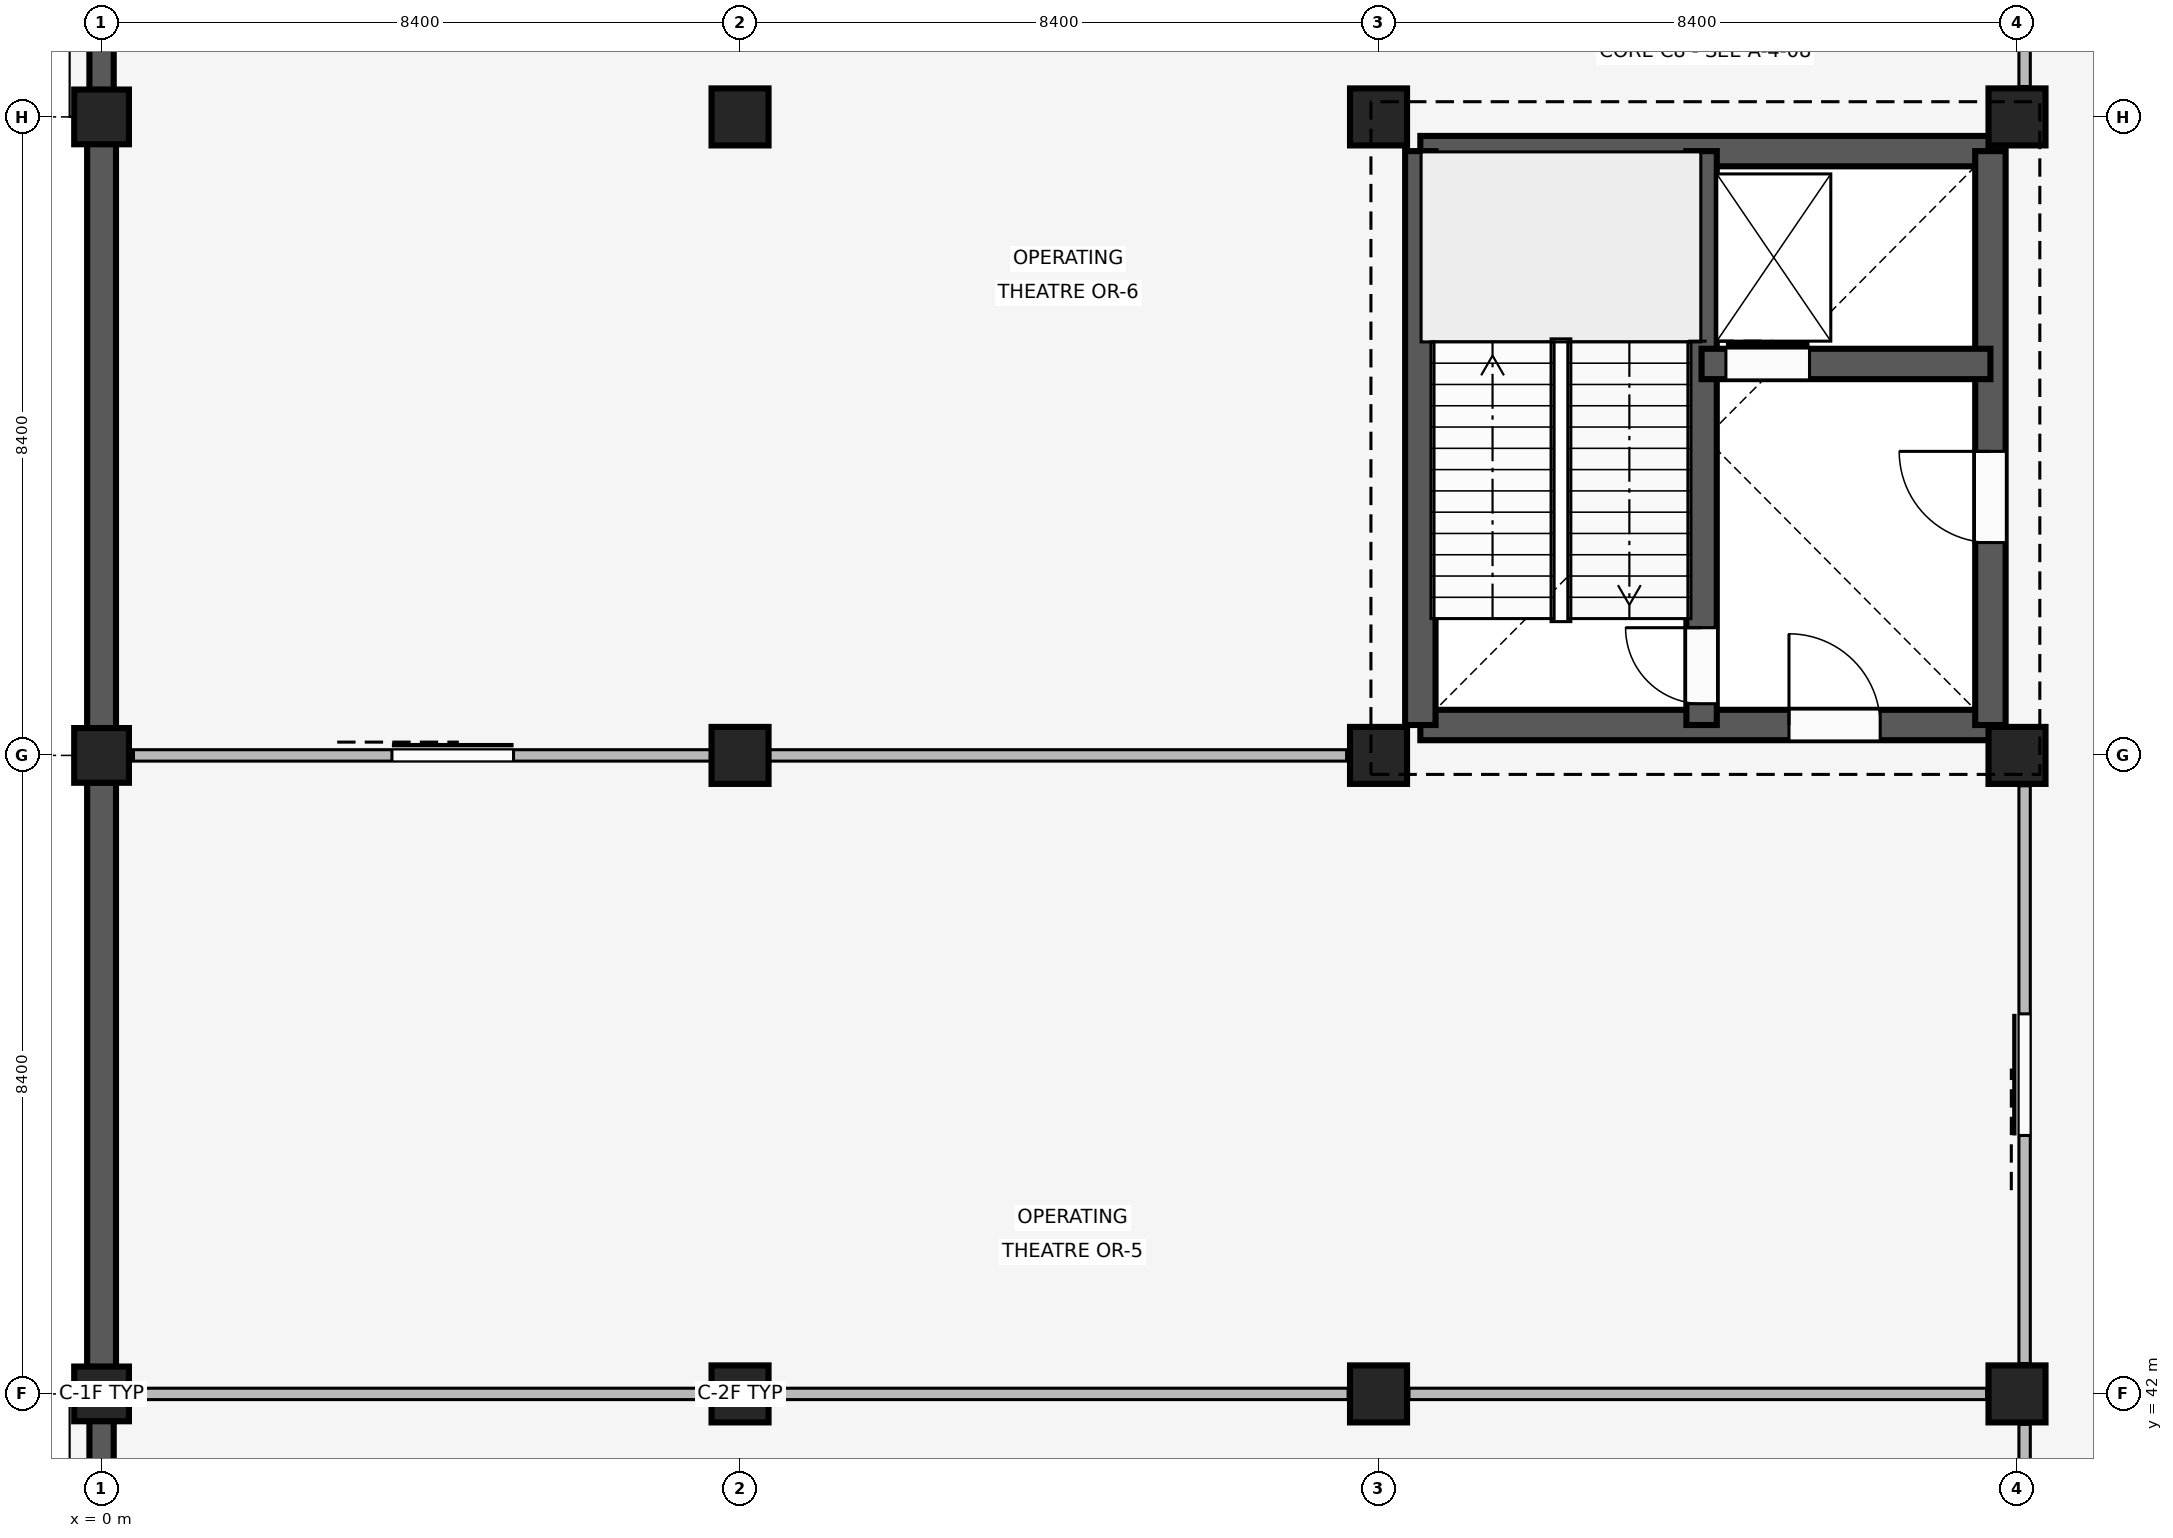
"""IFC4 building model, lengths in metres.
Left out: names, types, materials, properties, quantities, classifications, styles, units other than length and angle.
Written with IfcOpenShell. Run it as: python <this file> out.ifc"""

import sys

from ifc_helpers import new_model, si_unit, direction, frame, frame_2d, origin, origin_2d, place, context, subcontext, project, spatial, rectangle, extrude, element, fill, save


model = new_model("IFC4")
c1 = context("Model", 3, precision=1e-05, world=origin(), true_north=direction((0.0, 1.0)))
c2 = subcontext(c1, "Body", "Model", "MODEL_VIEW")
j1 = project(units=[si_unit("LENGTHUNIT", "METRE"), si_unit("PLANEANGLEUNIT", "RADIAN")], contexts=[c1])
p1 = place(None, origin())
s1 = spatial("IfcSite", under=j1, at=p1, CompositionType="ELEMENT")
p2 = place(p1, origin())
s2 = spatial("IfcBuilding", under=s1, at=p2, CompositionType="ELEMENT")
p3 = place(p2, frame((0.0, 0.0, 8.1)))
s3 = spatial("IfcBuildingStorey", under=s2, at=p3, CompositionType="ELEMENT", Elevation=8.1)
for number, where, z_axis, x_axis in (
    (1, (0.0, 42.0, 0.0), (0.0, 0.0, 1.0), (1.0, 0.0, 0.0)),
    (2, (0.0, 50.4, 0.0), (0.0, 0.0, 1.0), (1.0, 0.0, 0.0)),
    (3, (0.0, 58.8, 0.0), (0.0, 0.0, 1.0), (1.0, 0.0, 0.0)),
):
    element("IfcColumn", number, at=place(p3, frame(where, z_axis=z_axis, x_axis=x_axis)), inside=s3, PredefinedType="COLUMN", context=c2, shape_type="SweptSolid", body=[
        extrude(rectangle(XDim=0.72, YDim=0.72, at=origin_2d()), origin(), (0.0, 0.0, 1.0), 4.8),
    ])
for number, where, z_axis, x_axis in (
    (4, (8.4, 42.0, 0.0), (0.0, 0.0, 1.0), (1.0, 0.0, 0.0)),
    (5, (8.4, 50.4, 0.0), (0.0, 0.0, 1.0), (1.0, 0.0, 0.0)),
    (6, (8.4, 58.8, 0.0), (0.0, 0.0, 1.0), (1.0, 0.0, 0.0)),
    (7, (16.8, 42.0, 0.0), (0.0, 0.0, 1.0), (1.0, 0.0, 0.0)),
    (8, (16.8, 50.4, 0.0), (0.0, 0.0, 1.0), (1.0, 0.0, 0.0)),
    (9, (16.8, 58.8, 0.0), (0.0, 0.0, 1.0), (1.0, 0.0, 0.0)),
    (10, (25.2, 42.0, 0.0), (0.0, 0.0, 1.0), (1.0, 0.0, 0.0)),
    (11, (25.2, 50.4, 0.0), (0.0, 0.0, 1.0), (1.0, 0.0, 0.0)),
    (12, (25.2, 58.8, 0.0), (0.0, 0.0, 1.0), (1.0, 0.0, 0.0)),
):
    element("IfcColumn", number, at=place(p3, frame(where, z_axis=z_axis, x_axis=x_axis)), inside=s3, PredefinedType="COLUMN", context=c2, shape_type="SweptSolid", body=[
        extrude(rectangle(XDim=0.75, YDim=0.75, at=origin_2d()), origin(), (0.0, 0.0, 1.0), 4.8),
    ])
p4 = place(p3, frame((0.0, 33.955, 0.0), z_axis=(0.0, 0.0, 1.0), x_axis=(0.0, 1.0, 0.0)))
e13 = element("IfcWall", 13, at=p4, inside=s3, PredefinedType="SOLIDWALL", context=c2, shape_type="SweptSolid", body=[
    extrude(rectangle(XDim=7.69, YDim=0.32, at=frame_2d((3.845, 0.0))), origin(), (0.0, 0.0, 1.0), 3.86),
])
p5 = place(p4, frame((0.939, 0.0, 0.85)))
e14 = element("IfcOpeningElement", 14, at=p5, cuts=e13, PredefinedType="OPENING", context=c2, shape_type="SweptSolid", body=[
    extrude(rectangle(XDim=1.66, YDim=1.95, at=frame_2d((0.83, 0.975))), frame((0.0, 0.17, 0.0), z_axis=(0.0, -1.0, 0.0), x_axis=(1.0, 0.0, 0.0)), (0.0, 0.0, 1.0), 0.34),
])
p6 = place(p4, frame((5.091, 0.0, 0.85)))
e15 = element("IfcOpeningElement", 15, at=p6, cuts=e13, PredefinedType="OPENING", context=c2, shape_type="SweptSolid", body=[
    extrude(rectangle(XDim=1.66, YDim=1.95, at=frame_2d((0.83, 0.975))), frame((0.0, 0.17, 0.0), z_axis=(0.0, -1.0, 0.0), x_axis=(1.0, 0.0, 0.0)), (0.0, 0.0, 1.0), 0.34),
])
p7 = place(p3, frame((0.0, 42.355, 0.0), z_axis=(0.0, 0.0, 1.0), x_axis=(0.0, 1.0, 0.0)))
e16 = element("IfcWall", 16, at=p7, inside=s3, PredefinedType="SOLIDWALL", context=c2, shape_type="SweptSolid", body=[
    extrude(rectangle(XDim=7.69, YDim=0.38, at=frame_2d((3.845, 0.0))), origin(), (0.0, 0.0, 1.0), 3.86),
])
p8 = place(p3, frame((0.0, 50.755, 0.0), z_axis=(0.0, 0.0, 1.0), x_axis=(0.0, 1.0, 0.0)))
e17 = element("IfcWall", 17, at=p8, inside=s3, PredefinedType="SOLIDWALL", context=c2, shape_type="SweptSolid", body=[
    extrude(rectangle(XDim=7.69, YDim=0.38, at=frame_2d((3.845, 0.0))), origin(), (0.0, 0.0, 1.0), 3.86),
])
p9 = place(p3, frame((0.0, 59.155, 0.0), z_axis=(0.0, 0.0, 1.0), x_axis=(0.0, 1.0, 0.0)))
e18 = element("IfcWall", 18, at=p9, inside=s3, PredefinedType="SOLIDWALL", context=c2, shape_type="SweptSolid", body=[
    extrude(rectangle(XDim=7.69, YDim=0.32, at=frame_2d((3.845, 0.0))), origin(), (0.0, 0.0, 1.0), 3.86),
])
p10 = place(p9, frame((1.079, 0.0, 0.85)))
e19 = element("IfcOpeningElement", 19, at=p10, cuts=e18, PredefinedType="OPENING", context=c2, shape_type="SweptSolid", body=[
    extrude(rectangle(XDim=1.38, YDim=1.5, at=frame_2d((0.69, 0.75))), frame((0.0, 0.17, 0.0), z_axis=(0.0, -1.0, 0.0), x_axis=(1.0, 0.0, 0.0)), (0.0, 0.0, 1.0), 0.34),
])
p11 = place(p9, frame((5.231, 0.0, 0.85)))
e20 = element("IfcOpeningElement", 20, at=p11, cuts=e18, PredefinedType="OPENING", context=c2, shape_type="SweptSolid", body=[
    extrude(rectangle(XDim=1.38, YDim=1.5, at=frame_2d((0.69, 0.75))), frame((0.0, 0.17, 0.0), z_axis=(0.0, -1.0, 0.0), x_axis=(1.0, 0.0, 0.0)), (0.0, 0.0, 1.0), 0.34),
])
p12 = place(p3, frame((17.35, 50.8, 0.0), z_axis=(0.0, 0.0, 1.0), x_axis=(1.0, 0.0, 0.0)))
e21 = element("IfcWall", 21, at=p12, inside=s3, PredefinedType="SHEAR", context=c2, shape_type="SweptSolid", body=[
    extrude(rectangle(XDim=7.5, YDim=0.4, at=frame_2d((3.75, 0.0))), origin(), (0.0, 0.0, 1.0), 4.64),
])
p13 = place(p12, frame((4.85, 0.0, 0.0)))
e22 = element("IfcOpeningElement", 22, at=p13, cuts=e21, PredefinedType="OPENING", context=c2, shape_type="SweptSolid", body=[
    extrude(rectangle(XDim=1.2, YDim=2.2, at=frame_2d((0.6, 1.1))), frame((0.0, 0.21, 0.0), z_axis=(0.0, -1.0, 0.0), x_axis=(1.0, 0.0, 0.0)), (0.0, 0.0, 1.0), 0.42),
])
p14 = place(p3, frame((17.35, 58.35, 0.0), z_axis=(0.0, 0.0, 1.0), x_axis=(1.0, 0.0, 0.0)))
e23 = element("IfcWall", 23, at=p14, inside=s3, PredefinedType="SHEAR", context=c2, shape_type="SweptSolid", body=[
    extrude(rectangle(XDim=7.5, YDim=0.4, at=frame_2d((3.75, 0.0))), origin(), (0.0, 0.0, 1.0), 4.64),
])
p15 = place(p3, frame((17.35, 50.8, 0.0), z_axis=(0.0, 0.0, 1.0), x_axis=(0.0, 1.0, 0.0)))
e24 = element("IfcWall", 24, at=p15, inside=s3, PredefinedType="SHEAR", context=c2, shape_type="SweptSolid", body=[
    extrude(rectangle(XDim=7.55, YDim=0.4, at=frame_2d((3.775, 0.0))), origin(), (0.0, 0.0, 1.0), 4.64),
])
p16 = place(p3, frame((24.85, 50.8, 0.0), z_axis=(0.0, 0.0, 1.0), x_axis=(0.0, 1.0, 0.0)))
e25 = element("IfcWall", 25, at=p16, inside=s3, PredefinedType="SHEAR", context=c2, shape_type="SweptSolid", body=[
    extrude(rectangle(XDim=7.55, YDim=0.4, at=frame_2d((3.775, 0.0))), origin(), (0.0, 0.0, 1.0), 4.64),
])
p17 = place(p16, frame((2.4, 0.0, 0.0)))
e26 = element("IfcOpeningElement", 26, at=p17, cuts=e25, PredefinedType="OPENING", context=c2, shape_type="SweptSolid", body=[
    extrude(rectangle(XDim=1.2, YDim=2.2, at=frame_2d((0.6, 1.1))), frame((0.0, 0.21, 0.0), z_axis=(0.0, -1.0, 0.0), x_axis=(1.0, 0.0, 0.0)), (0.0, 0.0, 1.0), 0.42),
])
p18 = place(p3, frame((21.05, 50.8, 0.0), z_axis=(0.0, 0.0, 1.0), x_axis=(0.0, 1.0, 0.0)))
e27 = element("IfcWall", 27, at=p18, inside=s3, PredefinedType="SHEAR", context=c2, shape_type="SweptSolid", body=[
    extrude(rectangle(XDim=7.55, YDim=0.4, at=frame_2d((3.775, 0.0))), origin(), (0.0, 0.0, 1.0), 4.64),
])
p19 = place(p18, frame((0.28, 0.0, 0.0)))
e28 = element("IfcOpeningElement", 28, at=p19, cuts=e27, PredefinedType="OPENING", context=c2, shape_type="SweptSolid", body=[
    extrude(rectangle(XDim=1.0, YDim=2.15, at=frame_2d((0.5, 1.075))), frame((0.0, 0.21, 0.0), z_axis=(0.0, -1.0, 0.0), x_axis=(1.0, 0.0, 0.0)), (0.0, 0.0, 1.0), 0.42),
])
p20 = place(p3, frame((21.05, 55.55, 0.0), z_axis=(0.0, 0.0, 1.0), x_axis=(1.0, 0.0, 0.0)))
e29 = element("IfcWall", 29, at=p20, inside=s3, PredefinedType="SHEAR", context=c2, shape_type="SweptSolid", body=[
    extrude(rectangle(XDim=3.8, YDim=0.4, at=frame_2d((1.9, 0.0))), origin(), (0.0, 0.0, 1.0), 4.64),
])
p21 = place(p20, frame((0.32, 0.0, 0.0)))
e30 = element("IfcOpeningElement", 30, at=p21, cuts=e29, PredefinedType="OPENING", context=c2, shape_type="SweptSolid", body=[
    extrude(rectangle(XDim=1.1, YDim=2.15, at=frame_2d((0.55, 1.075))), frame((0.0, 0.21, 0.0), z_axis=(0.0, -1.0, 0.0), x_axis=(1.0, 0.0, 0.0)), (0.0, 0.0, 1.0), 0.42),
])
p22 = place(p3, frame((25.3, 34.0, 0.0), z_axis=(0.0, 0.0, 1.0), x_axis=(0.0, 1.0, 0.0)))
e31 = element("IfcWall", 31, at=p22, inside=s3, PredefinedType="PARTITIONING", context=c2, shape_type="SweptSolid", body=[
    extrude(rectangle(XDim=7.6, YDim=0.15, at=frame_2d((3.8, 0.0))), origin(), (0.0, 0.0, 1.0), 3.84),
])
p23 = place(p22, frame((3.0, 0.0, 0.0)))
e32 = element("IfcOpeningElement", 32, at=p23, cuts=e31, PredefinedType="OPENING", context=c2, shape_type="SweptSolid", body=[
    extrude(rectangle(XDim=1.6, YDim=2.35, at=frame_2d((0.8, 1.175))), frame((0.0, 0.085, 0.0), z_axis=(0.0, -1.0, 0.0), x_axis=(1.0, 0.0, 0.0)), (0.0, 0.0, 1.0), 0.17),
])
p24 = place(p3, frame((25.3, 42.4, 0.0), z_axis=(0.0, 0.0, 1.0), x_axis=(0.0, 1.0, 0.0)))
e33 = element("IfcWall", 33, at=p24, inside=s3, PredefinedType="PARTITIONING", context=c2, shape_type="SweptSolid", body=[
    extrude(rectangle(XDim=7.6, YDim=0.15, at=frame_2d((3.8, 0.0))), origin(), (0.0, 0.0, 1.0), 3.84),
])
p25 = place(p24, frame((3.0, 0.0, 0.0)))
e34 = element("IfcOpeningElement", 34, at=p25, cuts=e33, PredefinedType="OPENING", context=c2, shape_type="SweptSolid", body=[
    extrude(rectangle(XDim=1.6, YDim=2.35, at=frame_2d((0.8, 1.175))), frame((0.0, 0.085, 0.0), z_axis=(0.0, -1.0, 0.0), x_axis=(1.0, 0.0, 0.0)), (0.0, 0.0, 1.0), 0.17),
])
p26 = place(p3, frame((0.42, 50.4, 0.0), z_axis=(0.0, 0.0, 1.0), x_axis=(1.0, 0.0, 0.0)))
e35 = element("IfcWall", 35, at=p26, inside=s3, PredefinedType="PARTITIONING", context=c2, shape_type="SweptSolid", body=[
    extrude(rectangle(XDim=15.96, YDim=0.15, at=frame_2d((7.98, 0.0))), origin(), (0.0, 0.0, 1.0), 3.84),
])
p27 = place(p26, frame((3.4, 0.0, 0.0)))
e36 = element("IfcOpeningElement", 36, at=p27, cuts=e35, PredefinedType="OPENING", context=c2, shape_type="SweptSolid", body=[
    extrude(rectangle(XDim=1.6, YDim=2.35, at=frame_2d((0.8, 1.175))), frame((0.0, 0.085, 0.0), z_axis=(0.0, -1.0, 0.0), x_axis=(1.0, 0.0, 0.0)), (0.0, 0.0, 1.0), 0.17),
])
p28 = place(p3, frame((25.3, 59.2, 0.0), z_axis=(0.0, 0.0, 1.0), x_axis=(0.0, 1.0, 0.0)))
e37 = element("IfcWall", 37, at=p28, inside=s3, PredefinedType="PARTITIONING", context=c2, shape_type="SweptSolid", body=[
    extrude(rectangle(XDim=7.6, YDim=0.15, at=frame_2d((3.8, 0.0))), origin(), (0.0, 0.0, 1.0), 3.84),
])
p29 = place(p28, frame((3.0, 0.0, 0.0)))
e38 = element("IfcOpeningElement", 38, at=p29, cuts=e37, PredefinedType="OPENING", context=c2, shape_type="SweptSolid", body=[
    extrude(rectangle(XDim=1.6, YDim=2.35, at=frame_2d((0.8, 1.175))), frame((0.0, 0.085, 0.0), z_axis=(0.0, -1.0, 0.0), x_axis=(1.0, 0.0, 0.0)), (0.0, 0.0, 1.0), 0.17),
])
p30 = place(p3, frame((0.42, 42.0, 0.0), z_axis=(0.0, 0.0, 1.0), x_axis=(1.0, 0.0, 0.0)))
e39 = element("IfcWall", 39, at=p30, inside=s3, PredefinedType="PARTITIONING", context=c2, shape_type="SweptSolid", body=[
    extrude(rectangle(XDim=7.58, YDim=0.15, at=frame_2d((3.79, 0.0))), origin(), (0.0, 0.0, 1.0), 3.84),
])
p31 = place(p3, frame((8.8, 42.0, 0.0), z_axis=(0.0, 0.0, 1.0), x_axis=(1.0, 0.0, 0.0)))
e40 = element("IfcWall", 40, at=p31, inside=s3, PredefinedType="PARTITIONING", context=c2, shape_type="SweptSolid", body=[
    extrude(rectangle(XDim=7.6, YDim=0.15, at=frame_2d((3.8, 0.0))), origin(), (0.0, 0.0, 1.0), 3.84),
])
p32 = place(p3, frame((17.2, 42.0, 0.0), z_axis=(0.0, 0.0, 1.0), x_axis=(1.0, 0.0, 0.0)))
e41 = element("IfcWall", 41, at=p32, inside=s3, PredefinedType="PARTITIONING", context=c2, shape_type="SweptSolid", body=[
    extrude(rectangle(XDim=7.6, YDim=0.15, at=frame_2d((3.8, 0.0))), origin(), (0.0, 0.0, 1.0), 3.84),
])
p33 = place(p17, origin())
e42 = element("IfcDoor", 42, at=p33, inside=s3, OperationType="SINGLE_SWING_RIGHT", PredefinedType="DOOR", context=c2, shape_type="SweptSolid", body=[
    extrude(rectangle(XDim=1.2, YDim=2.2, at=frame_2d((0.6, 1.1))), frame((0.0, 0.025, 0.0), z_axis=(0.0, -1.0, 0.0), x_axis=(1.0, 0.0, 0.0)), (0.0, 0.0, 1.0), 0.05),
])
fill(e26, e42)
p34 = place(p13, origin())
e43 = element("IfcDoor", 43, at=p34, inside=s3, OperationType="SINGLE_SWING_LEFT", PredefinedType="DOOR", context=c2, shape_type="SweptSolid", body=[
    extrude(rectangle(XDim=1.2, YDim=2.2, at=frame_2d((0.6, 1.1))), frame((0.0, 0.025, 0.0), z_axis=(0.0, -1.0, 0.0), x_axis=(1.0, 0.0, 0.0)), (0.0, 0.0, 1.0), 0.05),
])
fill(e22, e43)
p35 = place(p19, origin())
e44 = element("IfcDoor", 44, at=p35, inside=s3, OperationType="SINGLE_SWING_RIGHT", PredefinedType="DOOR", context=c2, shape_type="SweptSolid", body=[
    extrude(rectangle(XDim=1.0, YDim=2.15, at=frame_2d((0.5, 1.075))), frame((0.0, 0.025, 0.0), z_axis=(0.0, -1.0, 0.0), x_axis=(1.0, 0.0, 0.0)), (0.0, 0.0, 1.0), 0.05),
])
fill(e28, e44)
p36 = place(p21, origin())
e45 = element("IfcDoor", 45, at=p36, inside=s3, OperationType="SLIDING_TO_LEFT", PredefinedType="DOOR", context=c2, shape_type="SweptSolid", body=[
    extrude(rectangle(XDim=1.1, YDim=2.15, at=frame_2d((0.55, 1.075))), frame((0.0, 0.025, 0.0), z_axis=(0.0, -1.0, 0.0), x_axis=(1.0, 0.0, 0.0)), (0.0, 0.0, 1.0), 0.05),
])
fill(e30, e45)
p37 = place(p25, origin())
e46 = element("IfcDoor", 46, at=p37, inside=s3, OperationType="SLIDING_TO_LEFT", PredefinedType="DOOR", context=c2, shape_type="SweptSolid", body=[
    extrude(rectangle(XDim=1.6, YDim=2.35, at=frame_2d((0.8, 1.175))), frame((0.0, 0.025, 0.0), z_axis=(0.0, -1.0, 0.0), x_axis=(1.0, 0.0, 0.0)), (0.0, 0.0, 1.0), 0.05),
])
fill(e34, e46)
p38 = place(p27, origin())
e47 = element("IfcDoor", 47, at=p38, inside=s3, OperationType="SLIDING_TO_LEFT", PredefinedType="DOOR", context=c2, shape_type="SweptSolid", body=[
    extrude(rectangle(XDim=1.6, YDim=2.35, at=frame_2d((0.8, 1.175))), frame((0.0, 0.025, 0.0), z_axis=(0.0, -1.0, 0.0), x_axis=(1.0, 0.0, 0.0)), (0.0, 0.0, 1.0), 0.05),
])
fill(e36, e47)
save(model, sys.argv[1])
